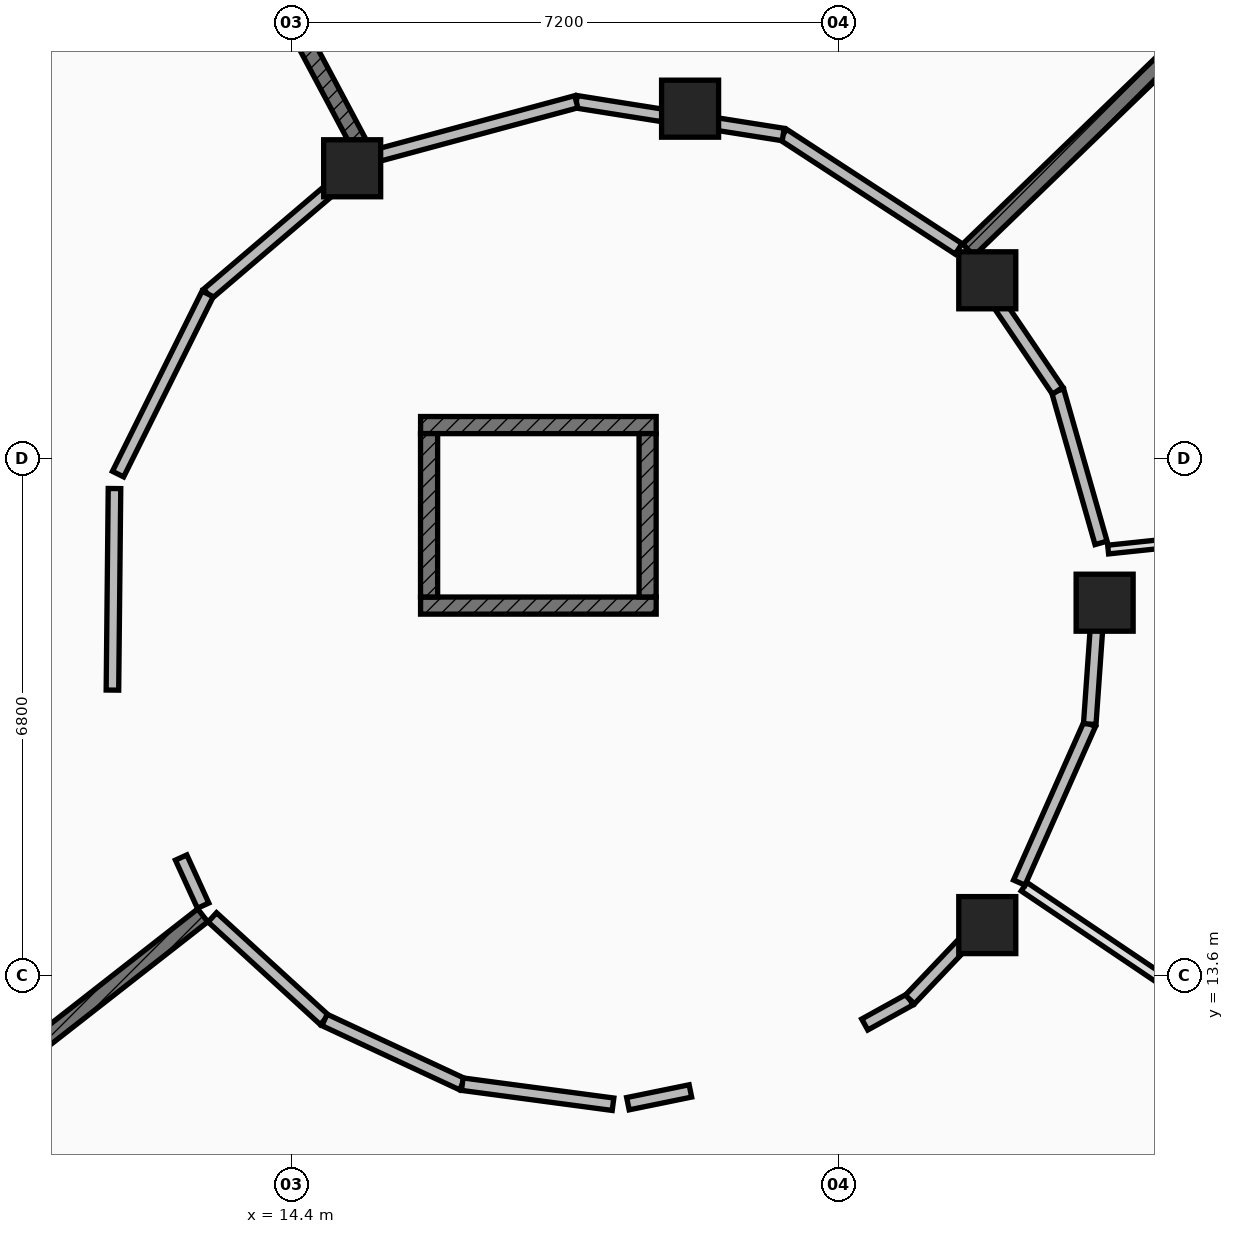
"""IFC4 building model, lengths in metres.
Left out: names, types, materials, properties, quantities, classifications, styles, units other than length and angle.
Written with IfcOpenShell. Run it as: python <this file> out.ifc"""

import sys

from ifc_helpers import new_model, si_unit, direction, frame, frame_2d, origin, origin_2d, place, context, subcontext, project, spatial, rectangle, extrude, element, fill, save


model = new_model("IFC4")
c1 = context("Model", 3, precision=1e-05, world=origin(), true_north=direction((0.0, 1.0)))
c2 = subcontext(c1, "Body", "Model", "MODEL_VIEW")
j1 = project(units=[si_unit("LENGTHUNIT", "METRE"), si_unit("PLANEANGLEUNIT", "RADIAN")], contexts=[c1])
p1 = place(None, origin())
s1 = spatial("IfcSite", under=j1, at=p1, CompositionType="ELEMENT")
p2 = place(p1, origin())
s2 = spatial("IfcBuilding", under=s1, at=p2, CompositionType="ELEMENT")
p3 = place(p2, frame((0.0, 0.0, -4.55)))
s3 = spatial("IfcBuildingStorey", under=s2, at=p3, CompositionType="ELEMENT", Elevation=-4.55)
for number, where, z_axis, x_axis in (
    (1, (25.1, 18.5, 0.0), (0.0, 0.0, 1.0), (1.0, 0.0, 0.0)),
    (2, (23.556, 22.742, 0.0), (0.0, 0.0, 1.0), (1.0, 0.0, 0.0)),
    (3, (19.646, 25.0, 0.0), (0.0, 0.0, 1.0), (1.0, 0.0, 0.0)),
    (4, (15.2, 24.216, 0.0), (0.0, 0.0, 1.0), (1.0, 0.0, 0.0)),
    (5, (23.556, 14.258, 0.0), (0.0, 0.0, 1.0), (1.0, 0.0, 0.0)),
):
    element("IfcColumn", number, at=place(p3, frame(where, z_axis=z_axis, x_axis=x_axis)), inside=s3, PredefinedType="COLUMN", context=c2, shape_type="SweptSolid", body=[
        extrude(rectangle(XDim=0.75, YDim=0.75, at=origin_2d()), origin(), (0.0, 0.0, 1.0), 4.55),
    ])
p4 = place(p3, frame((16.1, 18.462, 0.0), z_axis=(0.0, 0.0, 1.0), x_axis=(1.0, 0.0, 0.0)))
e6 = element("IfcWall", 6, at=p4, inside=s3, PredefinedType="SHEAR", context=c2, shape_type="SweptSolid", body=[
    extrude(rectangle(XDim=3.1, YDim=0.225, at=frame_2d((1.55, 0.0))), origin(), (0.0, 0.0, 1.0), 4.118),
])
p5 = place(p4, frame((0.9, 0.0, 0.0)))
e7 = element("IfcOpeningElement", 7, at=p5, cuts=e6, PredefinedType="OPENING", context=c2, shape_type="SweptSolid", body=[
    extrude(rectangle(XDim=1.3, YDim=2.2, at=frame_2d((0.65, 1.1))), frame((0.0, 0.123, 0.0), z_axis=(0.0, -1.0, 0.0), x_axis=(1.0, 0.0, 0.0)), (0.0, 0.0, 1.0), 0.245),
])
p6 = place(p3, frame((16.1, 20.837, 0.0), z_axis=(0.0, 0.0, 1.0), x_axis=(1.0, 0.0, 0.0)))
e8 = element("IfcWall", 8, at=p6, inside=s3, PredefinedType="SHEAR", context=c2, shape_type="SweptSolid", body=[
    extrude(rectangle(XDim=3.1, YDim=0.225, at=frame_2d((1.55, 0.0))), origin(), (0.0, 0.0, 1.0), 4.118),
])
for number, where, z_axis, x_axis in (
    (9, (16.212, 18.575, 0.0), (0.0, 0.0, 1.0), (0.0, 1.0, 0.0)),
    (10, (19.087, 18.575, 0.0), (0.0, 0.0, 1.0), (0.0, 1.0, 0.0)),
):
    element("IfcWall", number, at=place(p3, frame(where, z_axis=z_axis, x_axis=x_axis)), inside=s3, PredefinedType="SHEAR", context=c2, shape_type="SweptSolid", body=[
        extrude(rectangle(XDim=2.15, YDim=0.225, at=frame_2d((1.075, 0.0))), origin(), (0.0, 0.0, 1.0), 4.118),
    ])
p7 = place(p3, frame((23.307, 23.142, 0.0), z_axis=(0.0, 0.0, 1.0), x_axis=(0.719399195437, 0.694596859772, 0.0)))
e11 = element("IfcWall", 11, at=p7, inside=s3, PredefinedType="SOLIDWALL", context=c2, shape_type="SweptSolid", body=[
    extrude(rectangle(XDim=5.571, YDim=0.215, at=frame_2d((2.786, 0.0))), origin(), (0.0, 0.0, 1.0), 2.743),
])
p8 = place(p3, frame((15.363, 24.401, 0.0), z_axis=(0.0, 0.0, 1.0), x_axis=(-0.469553538459, 0.882904000739, 0.0)))
e12 = element("IfcWall", 12, at=p8, inside=s3, PredefinedType="SOLIDWALL", context=c2, shape_type="SweptSolid", body=[
    extrude(rectangle(XDim=5.586, YDim=0.215, at=frame_2d((2.793, 0.0))), origin(), (0.0, 0.0, 1.0), 2.743),
])
p9 = place(p3, frame((13.234, 14.386, 0.0), z_axis=(0.0, 0.0, 1.0), x_axis=(-0.787938235079, -0.615754283542, 0.0)))
e13 = element("IfcWall", 13, at=p9, inside=s3, PredefinedType="SOLIDWALL", context=c2, shape_type="SweptSolid", body=[
    extrude(rectangle(XDim=5.587, YDim=0.215, at=frame_2d((2.793, 0.0))), origin(), (0.0, 0.0, 1.0), 2.743),
])
p10 = place(p3, frame((24.04, 14.763, 0.0), z_axis=(0.0, 0.0, 1.0), x_axis=(0.829078742877, -0.559131861111, 0.0)))
e14 = element("IfcWall", 14, at=p10, inside=s3, PredefinedType="PLUMBINGWALL", context=c2, shape_type="SweptSolid", body=[
    extrude(rectangle(XDim=5.571, YDim=0.135, at=frame_2d((2.786, 0.0))), origin(), (0.0, 0.0, 1.0), 2.743),
])
p11 = place(p3, frame((25.146, 19.199, 0.0), z_axis=(0.0, 0.0, 1.0), x_axis=(0.994528479097, 0.10446580429, 0.0)))
e15 = element("IfcWall", 15, at=p11, inside=s3, PredefinedType="PARTITIONING", context=c2, shape_type="SweptSolid", body=[
    extrude(rectangle(XDim=5.572, YDim=0.115, at=frame_2d((2.786, 0.0))), origin(), (0.0, 0.0, 1.0), 2.743),
])
p12 = place(p3, frame((23.179, 23.155, 0.0), z_axis=(0.0, 0.0, 1.0), x_axis=(-0.837651139902, 0.546205609474, 0.0)))
e16 = element("IfcWall", 16, at=p12, inside=s3, PredefinedType="PARTITIONING", context=c2, shape_type="SweptSolid", body=[
    extrude(rectangle(XDim=2.755, YDim=0.165, at=frame_2d((1.377, 0.0))), origin(), (0.0, 0.0, 1.0), 2.743),
])
p13 = place(p12, frame((0.653, 0.0, 0.0)))
e17 = element("IfcOpeningElement", 17, at=p13, cuts=e16, PredefinedType="OPENING", context=c2, shape_type="SweptSolid", body=[
    extrude(rectangle(XDim=1.45, YDim=2.28, at=frame_2d((0.725, 1.14))), frame((0.0, 0.093, 0.0), z_axis=(0.0, -1.0, 0.0), x_axis=(1.0, 0.0, 0.0)), (0.0, 0.0, 1.0), 0.185),
])
p14 = place(p3, frame((20.871, 24.66, 0.0), z_axis=(0.0, 0.0, 1.0), x_axis=(-0.987795492529, 0.155756428245, 0.0)))
e18 = element("IfcWall", 18, at=p14, inside=s3, PredefinedType="PARTITIONING", context=c2, shape_type="SweptSolid", body=[
    extrude(rectangle(XDim=0.912, YDim=0.165, at=frame_2d((0.456, 0.0))), origin(), (0.0, 0.0, 1.0), 2.743),
])
p15 = place(p3, frame((19.277, 24.912, 0.0), z_axis=(0.0, 0.0, 1.0), x_axis=(-0.987651806417, 0.156664958689, 0.0)))
e19 = element("IfcWall", 19, at=p15, inside=s3, PredefinedType="PARTITIONING", context=c2, shape_type="SweptSolid", body=[
    extrude(rectangle(XDim=1.142, YDim=0.165, at=frame_2d((0.571, 0.0))), origin(), (0.0, 0.0, 1.0), 2.743),
])
p16 = place(p3, frame((18.149, 25.091, 0.0), z_axis=(0.0, 0.0, 1.0), x_axis=(-0.965481338685, -0.260472233935, 0.0)))
e20 = element("IfcWall", 20, at=p16, inside=s3, PredefinedType="PARTITIONING", context=c2, shape_type="SweptSolid", body=[
    extrude(rectangle(XDim=2.703, YDim=0.165, at=frame_2d((1.352, 0.0))), origin(), (0.0, 0.0, 1.0), 2.743),
])
p17 = place(p3, frame((14.928, 23.951, 0.0), z_axis=(0.0, 0.0, 1.0), x_axis=(-0.761161879136, -0.648561942879, 0.0)))
e21 = element("IfcWall", 21, at=p17, inside=s3, PredefinedType="PARTITIONING", context=c2, shape_type="SweptSolid", body=[
    extrude(rectangle(XDim=2.14, YDim=0.165, at=frame_2d((1.07, 0.0))), origin(), (0.0, 0.0, 1.0), 2.743),
])
p18 = place(p17, frame((0.395, 0.0, 0.0)))
e22 = element("IfcOpeningElement", 22, at=p18, cuts=e21, PredefinedType="OPENING", context=c2, shape_type="SweptSolid", body=[
    extrude(rectangle(XDim=1.35, YDim=2.22, at=frame_2d((0.675, 1.11))), frame((0.0, 0.093, 0.0), z_axis=(0.0, -1.0, 0.0), x_axis=(1.0, 0.0, 0.0)), (0.0, 0.0, 1.0), 0.185),
])
p19 = place(p3, frame((13.299, 22.563, 0.0), z_axis=(0.0, 0.0, 1.0), x_axis=(-0.445221024135, -0.895420705405, 0.0)))
e23 = element("IfcWall", 23, at=p19, inside=s3, PredefinedType="PARTITIONING", context=c2, shape_type="SweptSolid", body=[
    extrude(rectangle(XDim=2.648, YDim=0.165, at=frame_2d((1.324, 0.0))), origin(), (0.0, 0.0, 1.0), 2.743),
])
p20 = place(p3, frame((12.073, 20.002, 0.0), z_axis=(0.0, 0.0, 1.0), x_axis=(-0.010218578952, -0.999947788959, 0.0)))
e24 = element("IfcWall", 24, at=p20, inside=s3, PredefinedType="PARTITIONING", context=c2, shape_type="SweptSolid", body=[
    extrude(rectangle(XDim=2.652, YDim=0.165, at=frame_2d((1.326, 0.0))), origin(), (0.0, 0.0, 1.0), 2.743),
])
p21 = place(p20, frame((0.736, 0.0, 0.0)))
e25 = element("IfcOpeningElement", 25, at=p21, cuts=e24, PredefinedType="OPENING", context=c2, shape_type="SweptSolid", body=[
    extrude(rectangle(XDim=1.18, YDim=2.2, at=frame_2d((0.59, 1.1))), frame((0.0, 0.093, 0.0), z_axis=(0.0, -1.0, 0.0), x_axis=(1.0, 0.0, 0.0)), (0.0, 0.0, 1.0), 0.185),
])
p22 = place(p3, frame((12.95, 15.147, 0.0), z_axis=(0.0, 0.0, 1.0), x_axis=(0.415361769979, -0.909656308745, 0.0)))
e26 = element("IfcWall", 26, at=p22, inside=s3, PredefinedType="PARTITIONING", context=c2, shape_type="SweptSolid", body=[
    extrude(rectangle(XDim=0.696, YDim=0.165, at=frame_2d((0.348, 0.0))), origin(), (0.0, 0.0, 1.0), 2.743),
])
p23 = place(p3, frame((13.36, 14.36, 0.0), z_axis=(0.0, 0.0, 1.0), x_axis=(0.7378377453, -0.674978119357, 0.0)))
e27 = element("IfcWall", 27, at=p23, inside=s3, PredefinedType="PARTITIONING", context=c2, shape_type="SweptSolid", body=[
    extrude(rectangle(XDim=2.0, YDim=0.165, at=frame_2d((1.0, 0.0))), origin(), (0.0, 0.0, 1.0), 2.743),
])
p24 = place(p23, frame((0.325, 0.0, 0.0)))
e28 = element("IfcOpeningElement", 28, at=p24, cuts=e27, PredefinedType="OPENING", context=c2, shape_type="SweptSolid", body=[
    extrude(rectangle(XDim=1.35, YDim=2.22, at=frame_2d((0.675, 1.11))), frame((0.0, 0.093, 0.0), z_axis=(0.0, -1.0, 0.0), x_axis=(1.0, 0.0, 0.0)), (0.0, 0.0, 1.0), 0.185),
])
p25 = place(p3, frame((14.836, 13.01, 0.0), z_axis=(0.0, 0.0, 1.0), x_axis=(0.906391951023, -0.422437724548, 0.0)))
e29 = element("IfcWall", 29, at=p25, inside=s3, PredefinedType="PARTITIONING", context=c2, shape_type="SweptSolid", body=[
    extrude(rectangle(XDim=2.0, YDim=0.165, at=frame_2d((1.0, 0.0))), origin(), (0.0, 0.0, 1.0), 2.743),
])
p26 = place(p3, frame((16.649, 12.165, 0.0), z_axis=(0.0, 0.0, 1.0), x_axis=(0.991244944578, -0.1320358279, 0.0)))
e30 = element("IfcWall", 30, at=p26, inside=s3, PredefinedType="PARTITIONING", context=c2, shape_type="SweptSolid", body=[
    extrude(rectangle(XDim=2.001, YDim=0.165, at=frame_2d((1.0, 0.0))), origin(), (0.0, 0.0, 1.0), 2.743),
])
p27 = place(p3, frame((18.828, 11.908, 0.0), z_axis=(0.0, 0.0, 1.0), x_axis=(0.979755163157, 0.200199451218, 0.0)))
e31 = element("IfcWall", 31, at=p27, inside=s3, PredefinedType="PARTITIONING", context=c2, shape_type="SweptSolid", body=[
    extrude(rectangle(XDim=0.839, YDim=0.165, at=frame_2d((0.419, 0.0))), origin(), (0.0, 0.0, 1.0), 2.743),
])
p28 = place(p3, frame((21.944, 12.95, 0.0), z_axis=(0.0, 0.0, 1.0), x_axis=(0.874716328571, 0.484635269591, 0.0)))
e32 = element("IfcWall", 32, at=p28, inside=s3, PredefinedType="PARTITIONING", context=c2, shape_type="SweptSolid", body=[
    extrude(rectangle(XDim=0.679, YDim=0.165, at=frame_2d((0.339, 0.0))), origin(), (0.0, 0.0, 1.0), 2.743),
])
p29 = place(p3, frame((22.538, 13.279, 0.0), z_axis=(0.0, 0.0, 1.0), x_axis=(0.688972361281, 0.724787613988, 0.0)))
e33 = element("IfcWall", 33, at=p29, inside=s3, PredefinedType="PARTITIONING", context=c2, shape_type="SweptSolid", body=[
    extrude(rectangle(XDim=1.036, YDim=0.165, at=frame_2d((0.518, 0.0))), origin(), (0.0, 0.0, 1.0), 2.743),
])
p30 = place(p3, frame((23.977, 14.817, 0.0), z_axis=(0.0, 0.0, 1.0), x_axis=(0.406069005955, 0.913842416614, 0.0)))
e34 = element("IfcWall", 34, at=p30, inside=s3, PredefinedType="PARTITIONING", context=c2, shape_type="SweptSolid", body=[
    extrude(rectangle(XDim=2.283, YDim=0.165, at=frame_2d((1.142, 0.0))), origin(), (0.0, 0.0, 1.0), 2.743),
])
p31 = place(p30, frame((0.652, 0.0, 0.0)))
e35 = element("IfcOpeningElement", 35, at=p31, cuts=e34, PredefinedType="OPENING", context=c2, shape_type="SweptSolid", body=[
    extrude(rectangle(XDim=0.98, YDim=2.1, at=frame_2d((0.49, 1.05))), frame((0.0, 0.093, 0.0), z_axis=(0.0, -1.0, 0.0), x_axis=(1.0, 0.0, 0.0)), (0.0, 0.0, 1.0), 0.185),
])
p32 = place(p3, frame((24.904, 16.903, 0.0), z_axis=(0.0, 0.0, 1.0), x_axis=(0.070320535272, 0.997524446978, 0.0)))
e36 = element("IfcWall", 36, at=p32, inside=s3, PredefinedType="PARTITIONING", context=c2, shape_type="SweptSolid", body=[
    extrude(rectangle(XDim=1.236, YDim=0.165, at=frame_2d((0.618, 0.0))), origin(), (0.0, 0.0, 1.0), 2.743),
])
p33 = place(p3, frame((25.053, 19.287, 0.0), z_axis=(0.0, 0.0, 1.0), x_axis=(-0.274302899907, 0.961643342983, 0.0)))
e37 = element("IfcWall", 37, at=p33, inside=s3, PredefinedType="PARTITIONING", context=c2, shape_type="SweptSolid", body=[
    extrude(rectangle(XDim=2.082, YDim=0.165, at=frame_2d((1.041, 0.0))), origin(), (0.0, 0.0, 1.0), 2.743),
])
p34 = place(p33, frame((0.601, 0.0, 0.0)))
e38 = element("IfcOpeningElement", 38, at=p34, cuts=e37, PredefinedType="OPENING", context=c2, shape_type="SweptSolid", body=[
    extrude(rectangle(XDim=0.88, YDim=2.1, at=frame_2d((0.44, 1.05))), frame((0.0, 0.093, 0.0), z_axis=(0.0, -1.0, 0.0), x_axis=(1.0, 0.0, 0.0)), (0.0, 0.0, 1.0), 0.185),
])
p35 = place(p3, frame((24.482, 21.289, 0.0), z_axis=(0.0, 0.0, 1.0), x_axis=(-0.560466835651, 0.828176868872, 0.0)))
e39 = element("IfcWall", 39, at=p35, inside=s3, PredefinedType="PARTITIONING", context=c2, shape_type="SweptSolid", body=[
    extrude(rectangle(XDim=1.345, YDim=0.165, at=frame_2d((0.673, 0.0))), origin(), (0.0, 0.0, 1.0), 2.743),
])
p36 = place(p5, origin())
e40 = element("IfcDoor", 40, at=p36, inside=s3, OperationType="DOUBLE_DOOR_SLIDING", PredefinedType="DOOR", context=c2, shape_type="SweptSolid", body=[
    extrude(rectangle(XDim=1.3, YDim=2.2, at=frame_2d((0.65, 1.1))), frame((0.0, 0.025, 0.0), z_axis=(0.0, -1.0, 0.0), x_axis=(1.0, 0.0, 0.0)), (0.0, 0.0, 1.0), 0.05),
])
fill(e7, e40)
p37 = place(p13, origin())
e41 = element("IfcDoor", 41, at=p37, inside=s3, OperationType="SINGLE_SWING_LEFT", PredefinedType="DOOR", context=c2, shape_type="SweptSolid", body=[
    extrude(rectangle(XDim=1.45, YDim=2.28, at=frame_2d((0.725, 1.14))), frame((0.0, 0.025, 0.0), z_axis=(0.0, -1.0, 0.0), x_axis=(1.0, 0.0, 0.0)), (0.0, 0.0, 1.0), 0.05),
])
fill(e17, e41)
p38 = place(p18, origin())
e42 = element("IfcDoor", 42, at=p38, inside=s3, OperationType="SINGLE_SWING_RIGHT", PredefinedType="DOOR", context=c2, shape_type="SweptSolid", body=[
    extrude(rectangle(XDim=1.35, YDim=2.22, at=frame_2d((0.675, 1.11))), frame((0.0, 0.025, 0.0), z_axis=(0.0, -1.0, 0.0), x_axis=(1.0, 0.0, 0.0)), (0.0, 0.0, 1.0), 0.05),
])
fill(e22, e42)
p39 = place(p21, origin())
e43 = element("IfcDoor", 43, at=p39, inside=s3, OperationType="SINGLE_SWING_LEFT", PredefinedType="DOOR", context=c2, shape_type="SweptSolid", body=[
    extrude(rectangle(XDim=1.18, YDim=2.2, at=frame_2d((0.59, 1.1))), frame((0.0, 0.025, 0.0), z_axis=(0.0, -1.0, 0.0), x_axis=(1.0, 0.0, 0.0)), (0.0, 0.0, 1.0), 0.05),
])
fill(e25, e43)
p40 = place(p24, origin())
e44 = element("IfcDoor", 44, at=p40, inside=s3, OperationType="SINGLE_SWING_RIGHT", PredefinedType="DOOR", context=c2, shape_type="SweptSolid", body=[
    extrude(rectangle(XDim=1.35, YDim=2.22, at=frame_2d((0.675, 1.11))), frame((0.0, 0.025, 0.0), z_axis=(0.0, -1.0, 0.0), x_axis=(1.0, 0.0, 0.0)), (0.0, 0.0, 1.0), 0.05),
])
fill(e28, e44)
p41 = place(p31, origin())
e45 = element("IfcDoor", 45, at=p41, inside=s3, OperationType="SINGLE_SWING_LEFT", PredefinedType="DOOR", context=c2, shape_type="SweptSolid", body=[
    extrude(rectangle(XDim=0.98, YDim=2.1, at=frame_2d((0.49, 1.05))), frame((0.0, 0.025, 0.0), z_axis=(0.0, -1.0, 0.0), x_axis=(1.0, 0.0, 0.0)), (0.0, 0.0, 1.0), 0.05),
])
fill(e35, e45)
p42 = place(p34, origin())
e46 = element("IfcDoor", 46, at=p42, inside=s3, OperationType="SINGLE_SWING_RIGHT", PredefinedType="DOOR", context=c2, shape_type="SweptSolid", body=[
    extrude(rectangle(XDim=0.88, YDim=2.1, at=frame_2d((0.44, 1.05))), frame((0.0, 0.025, 0.0), z_axis=(0.0, -1.0, 0.0), x_axis=(1.0, 0.0, 0.0)), (0.0, 0.0, 1.0), 0.05),
])
fill(e38, e46)
save(model, sys.argv[1])
